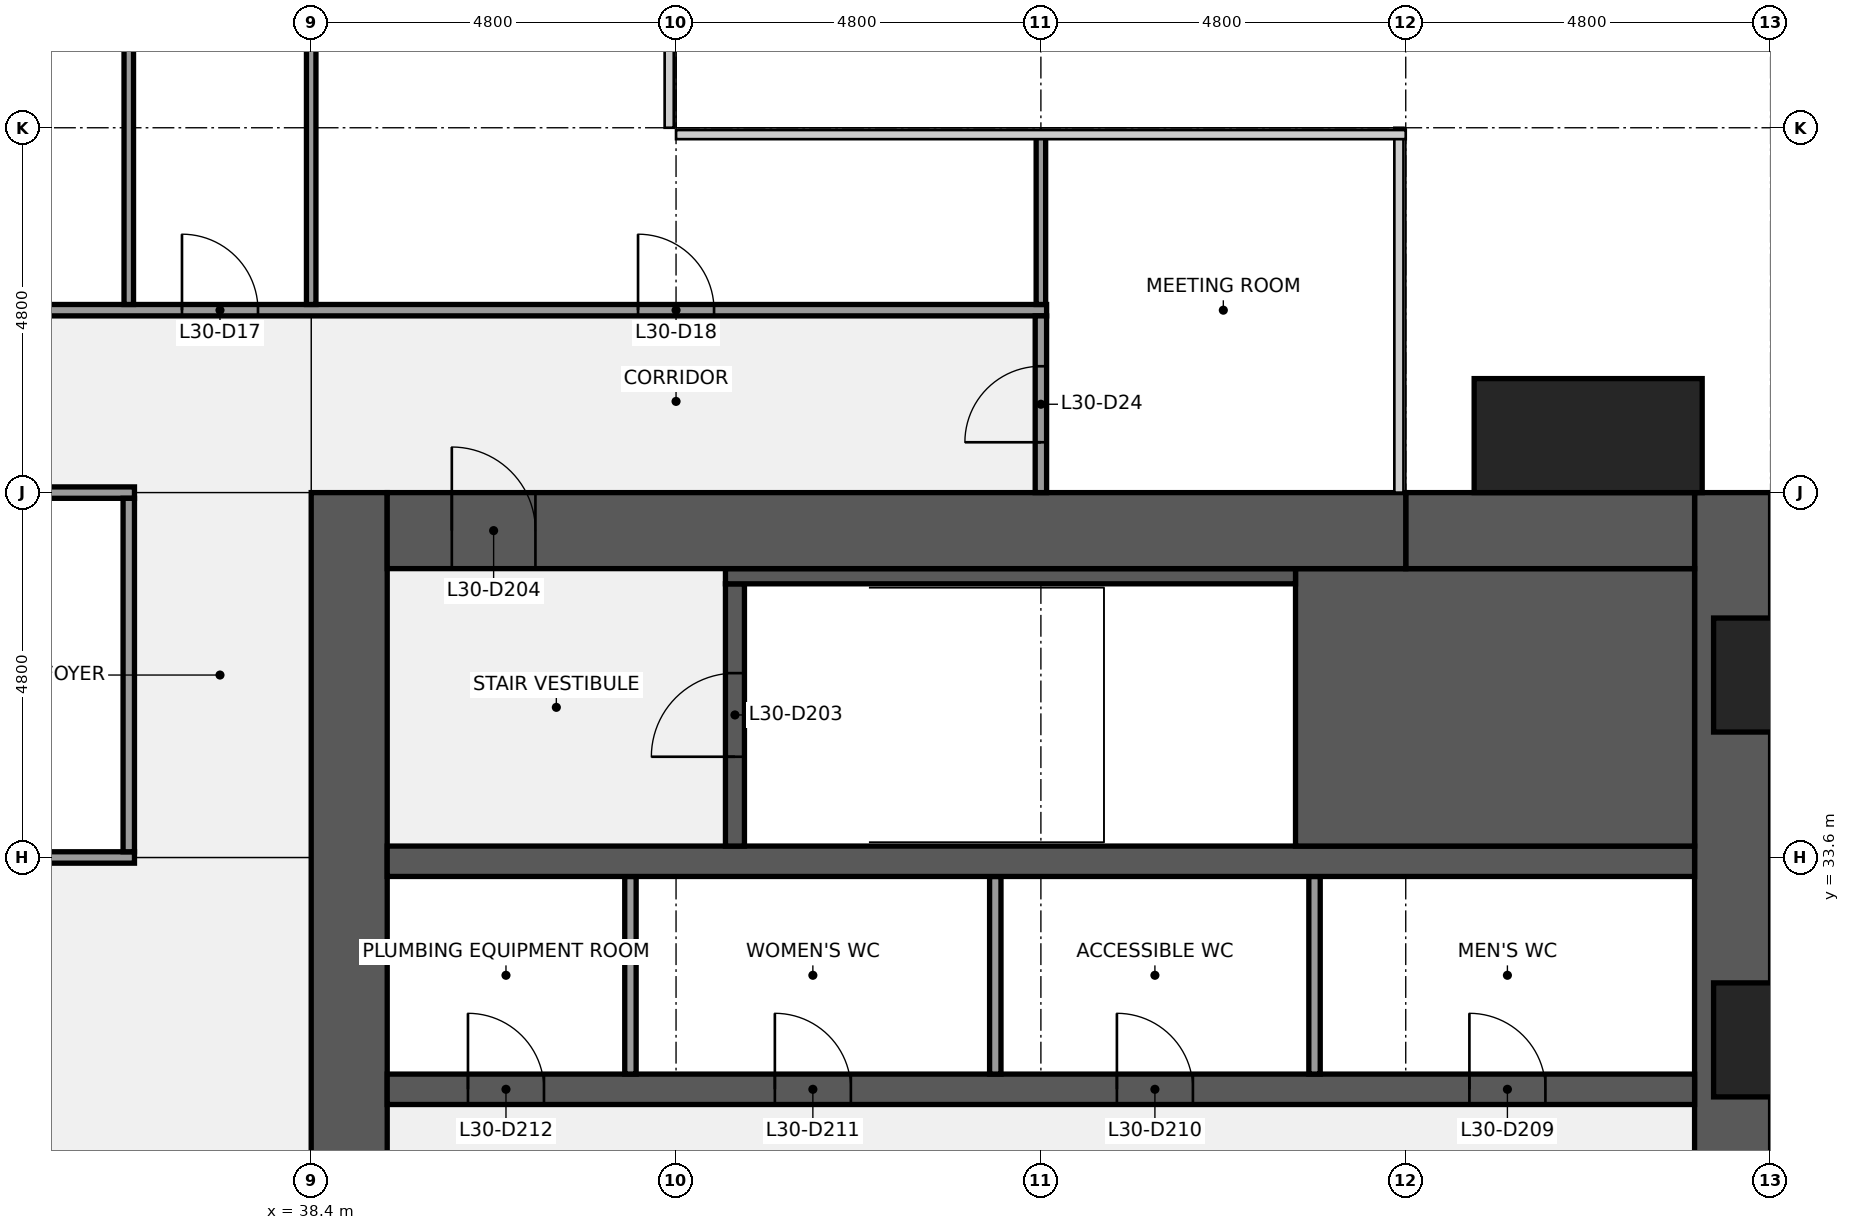
"""IFC4 building model, lengths in metres.
Left out: names, types, materials, properties, quantities, classifications, styles, units other than length and angle.
Written with IfcOpenShell. Run it as: python <this file> out.ifc"""

import sys

from ifc_helpers import new_model, si_unit, direction, frame, frame_2d, origin, origin_2d, place, context, subcontext, project, spatial, rectangle, extrude, element, fill, save


model = new_model("IFC4")
c1 = context("Model", 3, precision=1e-05, world=origin(), true_north=direction((0.0, 1.0)))
c2 = subcontext(c1, "Body", "Model", "MODEL_VIEW")
j1 = project(units=[si_unit("LENGTHUNIT", "METRE"), si_unit("PLANEANGLEUNIT", "RADIAN")], contexts=[c1])
p1 = place(None, origin())
s1 = spatial("IfcSite", under=j1, at=p1, CompositionType="ELEMENT")
p2 = place(p1, origin())
s2 = spatial("IfcBuilding", under=s1, at=p2, CompositionType="ELEMENT")
p3 = place(p2, frame((0.0, 0.0, 140.1)))
s3 = spatial("IfcBuildingStorey", under=s2, at=p3, CompositionType="ELEMENT", Elevation=140.1)
p4 = place(p3, frame((57.1, 38.4, 0.0), z_axis=(0.0, 0.0, 1.0), x_axis=(0.0, -1.0, 0.0)))
e1 = element("IfcWall", 1, at=p4, inside=s3, PredefinedType="SHEAR", context=c2, shape_type="SweptSolid", body=[
    extrude(rectangle(XDim=28.8, YDim=1.0, at=frame_2d((14.4, 0.0))), origin(), (0.0, 0.0, 1.0), 3.84),
])
p5 = place(p4, frame((18.45, 0.0, 0.9)))
e2 = element("IfcOpeningElement", 2, at=p5, cuts=e1, PredefinedType="OPENING", context=c2, shape_type="SweptSolid", body=[
    extrude(rectangle(XDim=1.5, YDim=1.5, at=frame_2d((0.75, 0.75))), frame((0.0, 0.51, 0.0), z_axis=(0.0, -1.0, 0.0), x_axis=(1.0, 0.0, 0.0)), (0.0, 0.0, 1.0), 1.02),
])
p6 = place(p4, frame((8.85, 0.0, 0.9)))
e3 = element("IfcOpeningElement", 3, at=p6, cuts=e1, PredefinedType="OPENING", context=c2, shape_type="SweptSolid", body=[
    extrude(rectangle(XDim=1.5, YDim=1.5, at=frame_2d((0.75, 0.75))), frame((0.0, 0.51, 0.0), z_axis=(0.0, -1.0, 0.0), x_axis=(1.0, 0.0, 0.0)), (0.0, 0.0, 1.0), 1.02),
])
p7 = place(p3, frame((38.9, 9.6, 0.0), z_axis=(0.0, 0.0, 1.0), x_axis=(0.0, 1.0, 0.0)))
e4 = element("IfcWall", 4, at=p7, inside=s3, PredefinedType="SHEAR", context=c2, shape_type="SweptSolid", body=[
    extrude(rectangle(XDim=28.8, YDim=1.0, at=frame_2d((14.4, 0.0))), origin(), (0.0, 0.0, 1.0), 3.84),
])
p8 = place(p7, frame((8.7, 0.0, 0.0)))
e5 = element("IfcOpeningElement", 5, at=p8, cuts=e4, PredefinedType="OPENING", context=c2, shape_type="SweptSolid", body=[
    extrude(rectangle(XDim=1.8, YDim=2.1, at=frame_2d((0.9, 1.05))), frame((0.0, 0.51, 0.0), z_axis=(0.0, -1.0, 0.0), x_axis=(1.0, 0.0, 0.0)), (0.0, 0.0, 1.0), 1.02),
])
p9 = place(p7, frame((18.3, 0.0, 0.0)))
e6 = element("IfcOpeningElement", 6, at=p9, cuts=e4, PredefinedType="OPENING", context=c2, shape_type="SweptSolid", body=[
    extrude(rectangle(XDim=1.8, YDim=2.1, at=frame_2d((0.9, 1.05))), frame((0.0, 0.51, 0.0), z_axis=(0.0, -1.0, 0.0), x_axis=(1.0, 0.0, 0.0)), (0.0, 0.0, 1.0), 1.02),
])
p10 = place(p3, frame((39.4, 30.55, 0.0), z_axis=(0.0, 0.0, 1.0), x_axis=(1.0, 0.0, 0.0)))
e7 = element("IfcWall", 7, at=p10, inside=s3, PredefinedType="SHEAR", context=c2, shape_type="SweptSolid", body=[
    extrude(rectangle(XDim=17.2, YDim=0.4, at=frame_2d((8.6, 0.0))), origin(), (0.0, 0.0, 1.0), 3.84),
])
p11 = place(p10, frame((14.238, 0.0, 0.0)))
e8 = element("IfcOpeningElement", 8, at=p11, cuts=e7, PredefinedType="OPENING", context=c2, shape_type="SweptSolid", body=[
    extrude(rectangle(XDim=1.0, YDim=2.1, at=frame_2d((0.5, 1.05))), frame((0.0, 0.21, 0.0), z_axis=(0.0, -1.0, 0.0), x_axis=(1.0, 0.0, 0.0)), (0.0, 0.0, 1.0), 0.42),
])
p12 = place(p10, frame((9.6, 0.0, 0.0)))
e9 = element("IfcOpeningElement", 9, at=p12, cuts=e7, PredefinedType="OPENING", context=c2, shape_type="SweptSolid", body=[
    extrude(rectangle(XDim=1.0, YDim=2.1, at=frame_2d((0.5, 1.05))), frame((0.0, 0.21, 0.0), z_axis=(0.0, -1.0, 0.0), x_axis=(1.0, 0.0, 0.0)), (0.0, 0.0, 1.0), 0.42),
])
p13 = place(p10, frame((5.1, 0.0, 0.0)))
e10 = element("IfcOpeningElement", 10, at=p13, cuts=e7, PredefinedType="OPENING", context=c2, shape_type="SweptSolid", body=[
    extrude(rectangle(XDim=1.0, YDim=2.1, at=frame_2d((0.5, 1.05))), frame((0.0, 0.21, 0.0), z_axis=(0.0, -1.0, 0.0), x_axis=(1.0, 0.0, 0.0)), (0.0, 0.0, 1.0), 0.42),
])
p14 = place(p10, frame((1.062, 0.0, 0.0)))
e11 = element("IfcOpeningElement", 11, at=p14, cuts=e7, PredefinedType="OPENING", context=c2, shape_type="SweptSolid", body=[
    extrude(rectangle(XDim=1.0, YDim=2.1, at=frame_2d((0.5, 1.05))), frame((0.0, 0.21, 0.0), z_axis=(0.0, -1.0, 0.0), x_axis=(1.0, 0.0, 0.0)), (0.0, 0.0, 1.0), 0.42),
])
for number, where, z_axis, x_axis in (
    (12, (51.6, 30.75, 0.0), (0.0, 0.0, 1.0), (0.0, 1.0, 0.0)),
    (13, (47.4, 30.75, 0.0), (0.0, 0.0, 1.0), (0.0, 1.0, 0.0)),
    (14, (42.6, 30.75, 0.0), (0.0, 0.0, 1.0), (0.0, 1.0, 0.0)),
):
    element("IfcWall", number, at=place(p3, frame(where, z_axis=z_axis, x_axis=x_axis)), inside=s3, PredefinedType="PARTITIONING", context=c2, shape_type="SweptSolid", body=[
        extrude(rectangle(XDim=2.6, YDim=0.15, at=frame_2d((1.3, 0.0))), origin(), (0.0, 0.0, 1.0), 3.84),
    ])
p15 = place(p3, frame((39.4, 33.55, 0.0), z_axis=(0.0, 0.0, 1.0), x_axis=(1.0, 0.0, 0.0)))
e15 = element("IfcWall", 15, at=p15, inside=s3, PredefinedType="SHEAR", context=c2, shape_type="SweptSolid", body=[
    extrude(rectangle(XDim=17.2, YDim=0.4, at=frame_2d((8.6, 0.0))), origin(), (0.0, 0.0, 1.0), 3.84),
])
p16 = place(p3, frame((51.35, 35.575, 0.0), z_axis=(0.0, 0.0, 1.0), x_axis=(1.0, 0.0, 0.0)))
e16 = element("IfcWall", 16, at=p16, inside=s3, PredefinedType="SHEAR", context=c2, shape_type="SweptSolid", body=[
    extrude(rectangle(XDim=5.25, YDim=3.65, at=frame_2d((2.625, 0.0))), origin(), (0.0, 0.0, 1.0), 3.84),
])
p17 = place(p3, frame((43.975, 33.75, 0.0), z_axis=(0.0, 0.0, 1.0), x_axis=(0.0, 1.0, 0.0)))
e17 = element("IfcWall", 17, at=p17, inside=s3, PredefinedType="SHEAR", context=c2, shape_type="SweptSolid", body=[
    extrude(rectangle(XDim=3.45, YDim=0.25, at=frame_2d((1.725, 0.0))), origin(), (0.0, 0.0, 1.0), 3.84),
])
p18 = place(p17, frame((1.175, 0.0, 0.0)))
e18 = element("IfcOpeningElement", 18, at=p18, cuts=e17, PredefinedType="OPENING", context=c2, shape_type="SweptSolid", body=[
    extrude(rectangle(XDim=1.1, YDim=2.1, at=frame_2d((0.55, 1.05))), frame((0.0, 0.135, 0.0), z_axis=(0.0, -1.0, 0.0), x_axis=(1.0, 0.0, 0.0)), (0.0, 0.0, 1.0), 0.27),
])
p19 = place(p3, frame((43.85, 37.3, 0.0), z_axis=(0.0, 0.0, 1.0), x_axis=(1.0, 0.0, 0.0)))
e19 = element("IfcWall", 19, at=p19, inside=s3, PredefinedType="SHEAR", context=c2, shape_type="SweptSolid", body=[
    extrude(rectangle(XDim=7.5, YDim=0.2, at=frame_2d((3.75, 0.0))), origin(), (0.0, 0.0, 1.0), 3.84),
])
p20 = place(p3, frame((52.8, 37.9, 0.0), z_axis=(0.0, 0.0, 1.0), x_axis=(1.0, 0.0, 0.0)))
e20 = element("IfcWall", 20, at=p20, inside=s3, PredefinedType="SHEAR", context=c2, shape_type="SweptSolid", body=[
    extrude(rectangle(XDim=3.8, YDim=1.0, at=frame_2d((1.9, 0.0))), origin(), (0.0, 0.0, 1.0), 3.84),
])
p21 = place(p3, frame((39.4, 37.9, 0.0), z_axis=(0.0, 0.0, 1.0), x_axis=(1.0, 0.0, 0.0)))
e21 = element("IfcWall", 21, at=p21, inside=s3, PredefinedType="SHEAR", context=c2, shape_type="SweptSolid", body=[
    extrude(rectangle(XDim=13.4, YDim=1.0, at=frame_2d((6.7, 0.0))), origin(), (0.0, 0.0, 1.0), 3.84),
])
p22 = place(p21, frame((0.85, 0.0, 0.0)))
e22 = element("IfcOpeningElement", 22, at=p22, cuts=e21, PredefinedType="OPENING", context=c2, shape_type="SweptSolid", body=[
    extrude(rectangle(XDim=1.1, YDim=2.1, at=frame_2d((0.55, 1.05))), frame((0.0, 0.51, 0.0), z_axis=(0.0, -1.0, 0.0), x_axis=(1.0, 0.0, 0.0)), (0.0, 0.0, 1.0), 1.02),
])
p23 = place(p3, frame((33.675, 33.6, 0.0), z_axis=(0.0, 0.0, 1.0), x_axis=(1.0, 0.0, 0.0)))
e23 = element("IfcWall", 23, at=p23, inside=s3, PredefinedType="PARTITIONING", context=c2, shape_type="SweptSolid", body=[
    extrude(rectangle(XDim=2.4, YDim=0.15, at=frame_2d((1.2, 0.0))), origin(), (0.0, 0.0, 1.0), 2.936),
])
p24 = place(p3, frame((21.525, 38.4, 0.0), z_axis=(0.0, 0.0, 1.0), x_axis=(1.0, 0.0, 0.0)))
e24 = element("IfcWall", 24, at=p24, inside=s3, PredefinedType="PARTITIONING", context=c2, shape_type="SweptSolid", body=[
    extrude(rectangle(XDim=14.55, YDim=0.15, at=frame_2d((7.275, 0.0))), origin(), (0.0, 0.0, 1.0), 2.936),
])
p25 = place(p24, frame((3.175, 0.0, 0.0)))
e25 = element("IfcOpeningElement", 25, at=p25, cuts=e24, PredefinedType="OPENING", context=c2, shape_type="SweptSolid", body=[
    extrude(rectangle(XDim=1.0, YDim=2.1, at=frame_2d((0.5, 1.05))), frame((0.0, 0.085, 0.0), z_axis=(0.0, -1.0, 0.0), x_axis=(1.0, 0.0, 0.0)), (0.0, 0.0, 1.0), 0.17),
])
p26 = place(p24, frame((10.375, 0.0, 0.0)))
e26 = element("IfcOpeningElement", 26, at=p26, cuts=e24, PredefinedType="OPENING", context=c2, shape_type="SweptSolid", body=[
    extrude(rectangle(XDim=1.0, YDim=2.1, at=frame_2d((0.5, 1.05))), frame((0.0, 0.085, 0.0), z_axis=(0.0, -1.0, 0.0), x_axis=(1.0, 0.0, 0.0)), (0.0, 0.0, 1.0), 0.17),
])
p27 = place(p3, frame((9.525, 40.8, 0.0), z_axis=(0.0, 0.0, 1.0), x_axis=(1.0, 0.0, 0.0)))
e27 = element("IfcWall", 27, at=p27, inside=s3, PredefinedType="PARTITIONING", context=c2, shape_type="SweptSolid", body=[
    extrude(rectangle(XDim=38.55, YDim=0.15, at=frame_2d((19.275, 0.0))), origin(), (0.0, 0.0, 1.0), 2.936),
])
p28 = place(p27, frame((4.375, 0.0, 0.0)))
e28 = element("IfcOpeningElement", 28, at=p28, cuts=e27, PredefinedType="OPENING", context=c2, shape_type="SweptSolid", body=[
    extrude(rectangle(XDim=1.0, YDim=2.1, at=frame_2d((0.5, 1.05))), frame((0.0, 0.085, 0.0), z_axis=(0.0, -1.0, 0.0), x_axis=(1.0, 0.0, 0.0)), (0.0, 0.0, 1.0), 0.17),
])
p29 = place(p27, frame((12.775, 0.0, 0.0)))
e29 = element("IfcOpeningElement", 29, at=p29, cuts=e27, PredefinedType="OPENING", context=c2, shape_type="SweptSolid", body=[
    extrude(rectangle(XDim=1.0, YDim=2.1, at=frame_2d((0.5, 1.05))), frame((0.0, 0.085, 0.0), z_axis=(0.0, -1.0, 0.0), x_axis=(1.0, 0.0, 0.0)), (0.0, 0.0, 1.0), 0.17),
])
p30 = place(p27, frame((17.575, 0.0, 0.0)))
e30 = element("IfcOpeningElement", 30, at=p30, cuts=e27, PredefinedType="OPENING", context=c2, shape_type="SweptSolid", body=[
    extrude(rectangle(XDim=1.0, YDim=2.1, at=frame_2d((0.5, 1.05))), frame((0.0, 0.085, 0.0), z_axis=(0.0, -1.0, 0.0), x_axis=(1.0, 0.0, 0.0)), (0.0, 0.0, 1.0), 0.17),
])
p31 = place(p27, frame((19.975, 0.0, 0.0)))
e31 = element("IfcOpeningElement", 31, at=p31, cuts=e27, PredefinedType="OPENING", context=c2, shape_type="SweptSolid", body=[
    extrude(rectangle(XDim=1.0, YDim=2.1, at=frame_2d((0.5, 1.05))), frame((0.0, 0.085, 0.0), z_axis=(0.0, -1.0, 0.0), x_axis=(1.0, 0.0, 0.0)), (0.0, 0.0, 1.0), 0.17),
])
p32 = place(p27, frame((23.575, 0.0, 0.0)))
e32 = element("IfcOpeningElement", 32, at=p32, cuts=e27, PredefinedType="OPENING", context=c2, shape_type="SweptSolid", body=[
    extrude(rectangle(XDim=1.0, YDim=2.1, at=frame_2d((0.5, 1.05))), frame((0.0, 0.085, 0.0), z_axis=(0.0, -1.0, 0.0), x_axis=(1.0, 0.0, 0.0)), (0.0, 0.0, 1.0), 0.17),
])
p33 = place(p27, frame((27.175, 0.0, 0.0)))
e33 = element("IfcOpeningElement", 33, at=p33, cuts=e27, PredefinedType="OPENING", context=c2, shape_type="SweptSolid", body=[
    extrude(rectangle(XDim=1.0, YDim=2.1, at=frame_2d((0.5, 1.05))), frame((0.0, 0.085, 0.0), z_axis=(0.0, -1.0, 0.0), x_axis=(1.0, 0.0, 0.0)), (0.0, 0.0, 1.0), 0.17),
])
p34 = place(p27, frame((33.175, 0.0, 0.0)))
e34 = element("IfcOpeningElement", 34, at=p34, cuts=e27, PredefinedType="OPENING", context=c2, shape_type="SweptSolid", body=[
    extrude(rectangle(XDim=1.0, YDim=2.1, at=frame_2d((0.5, 1.05))), frame((0.0, 0.085, 0.0), z_axis=(0.0, -1.0, 0.0), x_axis=(1.0, 0.0, 0.0)), (0.0, 0.0, 1.0), 0.17),
])
p35 = place(p3, frame((36.0, 40.875, 0.0), z_axis=(0.0, 0.0, 1.0), x_axis=(0.0, 1.0, 0.0)))
e35 = element("IfcWall", 35, at=p35, inside=s3, PredefinedType="PARTITIONING", context=c2, shape_type="SweptSolid", body=[
    extrude(rectangle(XDim=7.025, YDim=0.125, at=frame_2d((3.512, 0.0))), origin(), (0.0, 0.0, 1.0), 2.936),
])
p36 = place(p3, frame((36.0, 33.675, 0.0), z_axis=(0.0, 0.0, 1.0), x_axis=(0.0, 1.0, 0.0)))
e36 = element("IfcWall", 36, at=p36, inside=s3, PredefinedType="PARTITIONING", context=c2, shape_type="SweptSolid", body=[
    extrude(rectangle(XDim=4.65, YDim=0.15, at=frame_2d((2.325, 0.0))), origin(), (0.0, 0.0, 1.0), 2.936),
])
p37 = place(p3, frame((38.4, 40.875, 0.0), z_axis=(0.0, 0.0, 1.0), x_axis=(0.0, 1.0, 0.0)))
e37 = element("IfcWall", 37, at=p37, inside=s3, PredefinedType="PARTITIONING", context=c2, shape_type="SweptSolid", body=[
    extrude(rectangle(XDim=6.525, YDim=0.125, at=frame_2d((3.262, 0.0))), origin(), (0.0, 0.0, 1.0), 2.936),
])
p38 = place(p3, frame((48.0, 40.875, 0.0), z_axis=(0.0, 0.0, 1.0), x_axis=(0.0, 1.0, 0.0)))
e38 = element("IfcWall", 38, at=p38, inside=s3, PredefinedType="PARTITIONING", context=c2, shape_type="SweptSolid", body=[
    extrude(rectangle(XDim=2.225, YDim=0.125, at=frame_2d((1.113, 0.0))), origin(), (0.0, 0.0, 1.0), 2.936),
])
p39 = place(p3, frame((48.0, 38.4, 0.0), z_axis=(0.0, 0.0, 1.0), x_axis=(0.0, 1.0, 0.0)))
e39 = element("IfcWall", 39, at=p39, inside=s3, PredefinedType="PARTITIONING", context=c2, shape_type="SweptSolid", body=[
    extrude(rectangle(XDim=2.325, YDim=0.15, at=frame_2d((1.163, 0.0))), origin(), (0.0, 0.0, 1.0), 2.936),
])
p40 = place(p39, frame((0.663, 0.0, 0.0)))
e40 = element("IfcOpeningElement", 40, at=p40, cuts=e39, PredefinedType="OPENING", context=c2, shape_type="SweptSolid", body=[
    extrude(rectangle(XDim=1.0, YDim=2.1, at=frame_2d((0.5, 1.05))), frame((0.0, 0.085, 0.0), z_axis=(0.0, -1.0, 0.0), x_axis=(1.0, 0.0, 0.0)), (0.0, 0.0, 1.0), 0.17),
])
p41 = place(p3, frame((55.2, 39.15, 0.0), z_axis=(0.0, 0.0, 1.0), x_axis=(1.0, 0.0, 0.0)))
e41 = element("IfcColumn", 41, at=p41, inside=s3, PredefinedType="PILASTER", context=c2, shape_type="SweptSolid", body=[
    extrude(rectangle(XDim=3.0, YDim=1.5, at=origin_2d()), origin(), (0.0, 0.0, 1.0), 4.0),
])
p42 = place(p18, origin())
e42 = element("IfcDoor", 42, at=p42, inside=s3, OperationType="SINGLE_SWING_LEFT", PredefinedType="DOOR", context=c2, shape_type="SweptSolid", body=[
    extrude(rectangle(XDim=1.1, YDim=2.1, at=frame_2d((0.55, 1.05))), frame((0.0, 0.025, 0.0), z_axis=(0.0, -1.0, 0.0), x_axis=(1.0, 0.0, 0.0)), (0.0, 0.0, 1.0), 0.05),
])
fill(e18, e42)
p43 = place(p22, origin())
e43 = element("IfcDoor", 43, at=p43, inside=s3, OperationType="SINGLE_SWING_LEFT", PredefinedType="DOOR", context=c2, shape_type="SweptSolid", body=[
    extrude(rectangle(XDim=1.1, YDim=2.1, at=frame_2d((0.55, 1.05))), frame((0.0, 0.025, 0.0), z_axis=(0.0, -1.0, 0.0), x_axis=(1.0, 0.0, 0.0)), (0.0, 0.0, 1.0), 0.05),
])
fill(e22, e43)
p44 = place(p11, origin())
e44 = element("IfcDoor", 44, at=p44, inside=s3, OperationType="SINGLE_SWING_LEFT", PredefinedType="DOOR", context=c2, shape_type="SweptSolid", body=[
    extrude(rectangle(XDim=1.0, YDim=2.1, at=frame_2d((0.5, 1.05))), frame((0.0, 0.025, 0.0), z_axis=(0.0, -1.0, 0.0), x_axis=(1.0, 0.0, 0.0)), (0.0, 0.0, 1.0), 0.05),
])
fill(e8, e44)
p45 = place(p12, origin())
e45 = element("IfcDoor", 45, at=p45, inside=s3, OperationType="SINGLE_SWING_LEFT", PredefinedType="DOOR", context=c2, shape_type="SweptSolid", body=[
    extrude(rectangle(XDim=1.0, YDim=2.1, at=frame_2d((0.5, 1.05))), frame((0.0, 0.025, 0.0), z_axis=(0.0, -1.0, 0.0), x_axis=(1.0, 0.0, 0.0)), (0.0, 0.0, 1.0), 0.05),
])
fill(e9, e45)
p46 = place(p13, origin())
e46 = element("IfcDoor", 46, at=p46, inside=s3, OperationType="SINGLE_SWING_LEFT", PredefinedType="DOOR", context=c2, shape_type="SweptSolid", body=[
    extrude(rectangle(XDim=1.0, YDim=2.1, at=frame_2d((0.5, 1.05))), frame((0.0, 0.025, 0.0), z_axis=(0.0, -1.0, 0.0), x_axis=(1.0, 0.0, 0.0)), (0.0, 0.0, 1.0), 0.05),
])
fill(e10, e46)
p47 = place(p14, origin())
e47 = element("IfcDoor", 47, at=p47, inside=s3, OperationType="SINGLE_SWING_LEFT", PredefinedType="DOOR", context=c2, shape_type="SweptSolid", body=[
    extrude(rectangle(XDim=1.0, YDim=2.1, at=frame_2d((0.5, 1.05))), frame((0.0, 0.025, 0.0), z_axis=(0.0, -1.0, 0.0), x_axis=(1.0, 0.0, 0.0)), (0.0, 0.0, 1.0), 0.05),
])
fill(e11, e47)
p48 = place(p33, origin())
e48 = element("IfcDoor", 48, at=p48, inside=s3, OperationType="SINGLE_SWING_LEFT", PredefinedType="DOOR", context=c2, shape_type="SweptSolid", body=[
    extrude(rectangle(XDim=1.0, YDim=2.1, at=frame_2d((0.5, 1.05))), frame((0.0, 0.025, 0.0), z_axis=(0.0, -1.0, 0.0), x_axis=(1.0, 0.0, 0.0)), (0.0, 0.0, 1.0), 0.05),
])
fill(e33, e48)
p49 = place(p34, origin())
e49 = element("IfcDoor", 49, at=p49, inside=s3, OperationType="SINGLE_SWING_LEFT", PredefinedType="DOOR", context=c2, shape_type="SweptSolid", body=[
    extrude(rectangle(XDim=1.0, YDim=2.1, at=frame_2d((0.5, 1.05))), frame((0.0, 0.025, 0.0), z_axis=(0.0, -1.0, 0.0), x_axis=(1.0, 0.0, 0.0)), (0.0, 0.0, 1.0), 0.05),
])
fill(e34, e49)
p50 = place(p40, origin())
e50 = element("IfcDoor", 50, at=p50, inside=s3, OperationType="SINGLE_SWING_LEFT", PredefinedType="DOOR", context=c2, shape_type="SweptSolid", body=[
    extrude(rectangle(XDim=1.0, YDim=2.1, at=frame_2d((0.5, 1.05))), frame((0.0, 0.025, 0.0), z_axis=(0.0, -1.0, 0.0), x_axis=(1.0, 0.0, 0.0)), (0.0, 0.0, 1.0), 0.05),
])
fill(e40, e50)
save(model, sys.argv[1])
